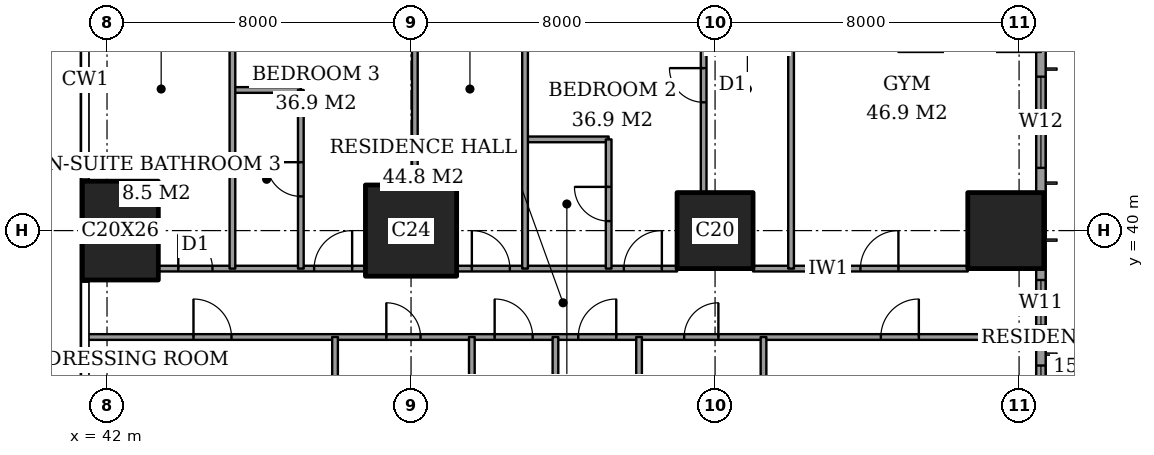
"""IFC4 building model, lengths in metres.
Left out: names, types, materials, properties, quantities, classifications, styles, units other than length and angle.
Written with IfcOpenShell. Run it as: python <this file> out.ifc"""

import sys

from ifc_helpers import new_model, si_unit, direction, frame, frame_2d, origin, origin_2d, place, context, subcontext, project, spatial, rectangle, extrude, element, fill, save


model = new_model("IFC4")
c1 = context("Model", 3, precision=1e-05, world=origin(), true_north=direction((0.0, 1.0)))
c2 = subcontext(c1, "Body", "Model", "MODEL_VIEW")
j1 = project(units=[si_unit("LENGTHUNIT", "METRE"), si_unit("PLANEANGLEUNIT", "RADIAN")], contexts=[c1])
p1 = place(None, origin())
s1 = spatial("IfcSite", under=j1, at=p1, CompositionType="ELEMENT")
p2 = place(p1, origin())
s2 = spatial("IfcBuilding", under=s1, at=p2, CompositionType="ELEMENT")
p3 = place(p2, frame((0.0, 0.0, 150.2)))
s3 = spatial("IfcBuildingStorey", under=s2, at=p3, CompositionType="ELEMENT", Elevation=150.2)
p4 = place(p3, frame((42.35, 40.0, 0.0), z_axis=(0.0, 0.0, 1.0), x_axis=(1.0, 0.0, 0.0)))
e1 = element("IfcColumn", 1, at=p4, inside=s3, PredefinedType="COLUMN", context=c2, shape_type="SweptSolid", body=[
    extrude(rectangle(XDim=2.0, YDim=2.6, at=origin_2d()), origin(), (0.0, 0.0, 1.0), 3.6),
])
p5 = place(p3, frame((50.0, 40.0, 0.0), z_axis=(0.0, 0.0, 1.0), x_axis=(1.0, 0.0, 0.0)))
e2 = element("IfcColumn", 2, at=p5, inside=s3, PredefinedType="COLUMN", context=c2, shape_type="SweptSolid", body=[
    extrude(rectangle(XDim=2.4, YDim=2.4, at=origin_2d()), origin(), (0.0, 0.0, 1.0), 3.6),
])
for number, where, z_axis, x_axis in (
    (3, (58.0, 40.0, 0.0), (0.0, 0.0, 1.0), (1.0, 0.0, 0.0)),
    (4, (65.65, 40.0, 0.0), (0.0, 0.0, 1.0), (1.0, 0.0, 0.0)),
):
    element("IfcColumn", number, at=place(p3, frame(where, z_axis=z_axis, x_axis=x_axis)), inside=s3, PredefinedType="COLUMN", context=c2, shape_type="SweptSolid", body=[
        extrude(rectangle(XDim=2.0, YDim=2.0, at=origin_2d()), origin(), (0.0, 0.0, 1.0), 3.6),
    ])
p6 = place(p3, frame((66.575, 3.175, 0.0), z_axis=(0.0, 0.0, 1.0), x_axis=(0.0, 1.0, 0.0)))
e5 = element("IfcWall", 5, at=p6, inside=s3, PredefinedType="SOLIDWALL", context=c2, shape_type="SweptSolid", body=[
    extrude(rectangle(XDim=41.65, YDim=0.25, at=frame_2d((20.825, 0.0))), origin(), (0.0, 0.0, 1.0), 3.6),
])
p7 = place(p6, frame((0.775, 0.0, 0.4)))
e6 = element("IfcOpeningElement", 6, at=p7, cuts=e5, PredefinedType="OPENING", context=c2, shape_type="SweptSolid", body=[
    extrude(rectangle(XDim=2.4, YDim=2.2, at=frame_2d((1.2, 1.1))), frame((0.0, 0.135, 0.0), z_axis=(0.0, -1.0, 0.0), x_axis=(1.0, 0.0, 0.0)), (0.0, 0.0, 1.0), 0.27),
])
p8 = place(p6, frame((6.1, 0.0, 0.4)))
e7 = element("IfcOpeningElement", 7, at=p8, cuts=e5, PredefinedType="OPENING", context=c2, shape_type="SweptSolid", body=[
    extrude(rectangle(XDim=1.2, YDim=2.2, at=frame_2d((0.6, 1.1))), frame((0.0, 0.135, 0.0), z_axis=(0.0, -1.0, 0.0), x_axis=(1.0, 0.0, 0.0)), (0.0, 0.0, 1.0), 0.27),
])
p9 = place(p6, frame((8.275, 0.0, 0.4)))
e8 = element("IfcOpeningElement", 8, at=p9, cuts=e5, PredefinedType="OPENING", context=c2, shape_type="SweptSolid", body=[
    extrude(rectangle(XDim=2.4, YDim=2.2, at=frame_2d((1.2, 1.1))), frame((0.0, 0.135, 0.0), z_axis=(0.0, -1.0, 0.0), x_axis=(1.0, 0.0, 0.0)), (0.0, 0.0, 1.0), 0.27),
])
p10 = place(p6, frame((15.775, 0.0, 0.4)))
e9 = element("IfcOpeningElement", 9, at=p10, cuts=e5, PredefinedType="OPENING", context=c2, shape_type="SweptSolid", body=[
    extrude(rectangle(XDim=2.4, YDim=2.2, at=frame_2d((1.2, 1.1))), frame((0.0, 0.135, 0.0), z_axis=(0.0, -1.0, 0.0), x_axis=(1.0, 0.0, 0.0)), (0.0, 0.0, 1.0), 0.27),
])
p11 = place(p6, frame((23.475, 0.0, 0.4)))
e10 = element("IfcOpeningElement", 10, at=p11, cuts=e5, PredefinedType="OPENING", context=c2, shape_type="SweptSolid", body=[
    extrude(rectangle(XDim=2.4, YDim=2.2, at=frame_2d((1.2, 1.1))), frame((0.0, 0.135, 0.0), z_axis=(0.0, -1.0, 0.0), x_axis=(1.0, 0.0, 0.0)), (0.0, 0.0, 1.0), 0.27),
])
p12 = place(p6, frame((30.875, 0.0, 0.4)))
e11 = element("IfcOpeningElement", 11, at=p12, cuts=e5, PredefinedType="OPENING", context=c2, shape_type="SweptSolid", body=[
    extrude(rectangle(XDim=2.4, YDim=2.2, at=frame_2d((1.2, 1.1))), frame((0.0, 0.135, 0.0), z_axis=(0.0, -1.0, 0.0), x_axis=(1.0, 0.0, 0.0)), (0.0, 0.0, 1.0), 0.27),
])
p13 = place(p6, frame((34.325, 0.0, 0.4)))
e12 = element("IfcOpeningElement", 12, at=p13, cuts=e5, PredefinedType="OPENING", context=c2, shape_type="SweptSolid", body=[
    extrude(rectangle(XDim=1.2, YDim=2.2, at=frame_2d((0.6, 1.1))), frame((0.0, 0.135, 0.0), z_axis=(0.0, -1.0, 0.0), x_axis=(1.0, 0.0, 0.0)), (0.0, 0.0, 1.0), 0.27),
])
p14 = place(p6, frame((38.475, 0.0, 0.4)))
e13 = element("IfcOpeningElement", 13, at=p14, cuts=e5, PredefinedType="OPENING", context=c2, shape_type="SweptSolid", body=[
    extrude(rectangle(XDim=2.4, YDim=2.2, at=frame_2d((1.2, 1.1))), frame((0.0, 0.135, 0.0), z_axis=(0.0, -1.0, 0.0), x_axis=(1.0, 0.0, 0.0)), (0.0, 0.0, 1.0), 0.27),
])
p15 = place(p3, frame((41.439, 37.2, 0.0), z_axis=(0.0, 0.0, 1.0), x_axis=(1.0, 0.0, 0.0)))
e14 = element("IfcWall", 14, at=p15, inside=s3, PredefinedType="PARTITIONING", context=c2, shape_type="SweptSolid", body=[
    extrude(rectangle(XDim=25.011, YDim=0.15, at=frame_2d((12.505, 0.0))), origin(), (0.0, 0.0, 1.0), 3.35),
])
p16 = place(p15, frame((10.761, 0.0, 0.0)))
e15 = element("IfcOpeningElement", 15, at=p16, cuts=e14, PredefinedType="OPENING", context=c2, shape_type="SweptSolid", body=[
    extrude(rectangle(XDim=1.0, YDim=2.1, at=frame_2d((0.5, 1.05))), frame((0.0, 0.085, 0.0), z_axis=(0.0, -1.0, 0.0), x_axis=(1.0, 0.0, 0.0)), (0.0, 0.0, 1.0), 0.17),
])
p17 = place(p15, frame((20.924, 0.0, 0.0)))
e16 = element("IfcOpeningElement", 16, at=p17, cuts=e14, PredefinedType="OPENING", context=c2, shape_type="SweptSolid", body=[
    extrude(rectangle(XDim=1.0, YDim=2.1, at=frame_2d((0.5, 1.05))), frame((0.0, 0.085, 0.0), z_axis=(0.0, -1.0, 0.0), x_axis=(1.0, 0.0, 0.0)), (0.0, 0.0, 1.0), 0.17),
])
p18 = place(p15, frame((15.749, 0.0, 0.0)))
e17 = element("IfcOpeningElement", 17, at=p18, cuts=e14, PredefinedType="OPENING", context=c2, shape_type="SweptSolid", body=[
    extrude(rectangle(XDim=0.9, YDim=2.1, at=frame_2d((0.45, 1.05))), frame((0.0, 0.085, 0.0), z_axis=(0.0, -1.0, 0.0), x_axis=(1.0, 0.0, 0.0)), (0.0, 0.0, 1.0), 0.17),
])
p19 = place(p15, frame((12.961, 0.0, 0.0)))
e18 = element("IfcOpeningElement", 18, at=p19, cuts=e14, PredefinedType="OPENING", context=c2, shape_type="SweptSolid", body=[
    extrude(rectangle(XDim=1.0, YDim=2.1, at=frame_2d((0.5, 1.05))), frame((0.0, 0.085, 0.0), z_axis=(0.0, -1.0, 0.0), x_axis=(1.0, 0.0, 0.0)), (0.0, 0.0, 1.0), 0.17),
])
p20 = place(p15, frame((7.911, 0.0, 0.0)))
e19 = element("IfcOpeningElement", 19, at=p20, cuts=e14, PredefinedType="OPENING", context=c2, shape_type="SweptSolid", body=[
    extrude(rectangle(XDim=0.9, YDim=2.1, at=frame_2d((0.45, 1.05))), frame((0.0, 0.085, 0.0), z_axis=(0.0, -1.0, 0.0), x_axis=(1.0, 0.0, 0.0)), (0.0, 0.0, 1.0), 0.17),
])
p21 = place(p15, frame((2.836, 0.0, 0.0)))
e20 = element("IfcOpeningElement", 20, at=p21, cuts=e14, PredefinedType="OPENING", context=c2, shape_type="SweptSolid", body=[
    extrude(rectangle(XDim=1.0, YDim=2.1, at=frame_2d((0.5, 1.05))), frame((0.0, 0.085, 0.0), z_axis=(0.0, -1.0, 0.0), x_axis=(1.0, 0.0, 0.0)), (0.0, 0.0, 1.0), 0.17),
])
p22 = place(p3, frame((43.35, 39.0, 0.0), z_axis=(0.0, 0.0, 1.0), x_axis=(1.0, 0.0, 0.0)))
e21 = element("IfcWall", 21, at=p22, inside=s3, PredefinedType="PARTITIONING", context=c2, shape_type="SweptSolid", body=[
    extrude(rectangle(XDim=5.45, YDim=0.15, at=frame_2d((2.725, 0.0))), origin(), (0.0, 0.0, 1.0), 3.35),
])
p23 = place(p22, frame((4.1, 0.0, 0.0)))
e22 = element("IfcOpeningElement", 22, at=p23, cuts=e21, PredefinedType="OPENING", context=c2, shape_type="SweptSolid", body=[
    extrude(rectangle(XDim=1.0, YDim=2.1, at=frame_2d((0.5, 1.05))), frame((0.0, 0.085, 0.0), z_axis=(0.0, -1.0, 0.0), x_axis=(1.0, 0.0, 0.0)), (0.0, 0.0, 1.0), 0.17),
])
p24 = place(p22, frame((0.525, 0.0, 0.0)))
e23 = element("IfcOpeningElement", 23, at=p24, cuts=e21, PredefinedType="OPENING", context=c2, shape_type="SweptSolid", body=[
    extrude(rectangle(XDim=0.9, YDim=2.1, at=frame_2d((0.45, 1.05))), frame((0.0, 0.085, 0.0), z_axis=(0.0, -1.0, 0.0), x_axis=(1.0, 0.0, 0.0)), (0.0, 0.0, 1.0), 0.17),
])
p25 = place(p3, frame((51.2, 39.0, 0.0), z_axis=(0.0, 0.0, 1.0), x_axis=(1.0, 0.0, 0.0)))
e24 = element("IfcWall", 24, at=p25, inside=s3, PredefinedType="PARTITIONING", context=c2, shape_type="SweptSolid", body=[
    extrude(rectangle(XDim=5.8, YDim=0.15, at=frame_2d((2.9, 0.0))), origin(), (0.0, 0.0, 1.0), 3.35),
])
p26 = place(p25, frame((4.4, 0.0, 0.0)))
e25 = element("IfcOpeningElement", 25, at=p26, cuts=e24, PredefinedType="OPENING", context=c2, shape_type="SweptSolid", body=[
    extrude(rectangle(XDim=1.0, YDim=2.1, at=frame_2d((0.5, 1.05))), frame((0.0, 0.085, 0.0), z_axis=(0.0, -1.0, 0.0), x_axis=(1.0, 0.0, 0.0)), (0.0, 0.0, 1.0), 0.17),
])
p27 = place(p25, frame((0.4, 0.0, 0.0)))
e26 = element("IfcOpeningElement", 26, at=p27, cuts=e24, PredefinedType="OPENING", context=c2, shape_type="SweptSolid", body=[
    extrude(rectangle(XDim=1.0, YDim=2.1, at=frame_2d((0.5, 1.05))), frame((0.0, 0.085, 0.0), z_axis=(0.0, -1.0, 0.0), x_axis=(1.0, 0.0, 0.0)), (0.0, 0.0, 1.0), 0.17),
])
p28 = place(p3, frame((59.0, 39.0, 0.0), z_axis=(0.0, 0.0, 1.0), x_axis=(1.0, 0.0, 0.0)))
e27 = element("IfcWall", 27, at=p28, inside=s3, PredefinedType="PARTITIONING", context=c2, shape_type="SweptSolid", body=[
    extrude(rectangle(XDim=5.65, YDim=0.15, at=frame_2d((2.825, 0.0))), origin(), (0.0, 0.0, 1.0), 3.35),
])
p29 = place(p28, frame((2.825, 0.0, 0.0)))
e28 = element("IfcOpeningElement", 28, at=p29, cuts=e27, PredefinedType="OPENING", context=c2, shape_type="SweptSolid", body=[
    extrude(rectangle(XDim=1.0, YDim=2.1, at=frame_2d((0.5, 1.05))), frame((0.0, 0.085, 0.0), z_axis=(0.0, -1.0, 0.0), x_axis=(1.0, 0.0, 0.0)), (0.0, 0.0, 1.0), 0.17),
])
p30 = place(p3, frame((53.0, 42.4, 0.0), z_axis=(0.0, 0.0, 1.0), x_axis=(1.0, 0.0, 0.0)))
e29 = element("IfcWall", 29, at=p30, inside=s3, PredefinedType="PARTITIONING", context=c2, shape_type="SweptSolid", body=[
    extrude(rectangle(XDim=2.2, YDim=0.15, at=frame_2d((1.1, 0.0))), origin(), (0.0, 0.0, 1.0), 3.35),
])
p31 = place(p3, frame((45.3, 43.7, 0.0), z_axis=(0.0, 0.0, 1.0), x_axis=(1.0, 0.0, 0.0)))
e30 = element("IfcWall", 30, at=p31, inside=s3, PredefinedType="PARTITIONING", context=c2, shape_type="SweptSolid", body=[
    extrude(rectangle(XDim=1.8, YDim=0.15, at=frame_2d((0.9, 0.0))), origin(), (0.0, 0.0, 1.0), 3.35),
])
p32 = place(p3, frame((45.3, 39.0, 0.0), z_axis=(0.0, 0.0, 1.0), x_axis=(0.0, 1.0, 0.0)))
e31 = element("IfcWall", 31, at=p32, inside=s3, PredefinedType="PARTITIONING", context=c2, shape_type="SweptSolid", body=[
    extrude(rectangle(XDim=9.45, YDim=0.15, at=frame_2d((4.725, 0.0))), origin(), (0.0, 0.0, 1.0), 3.35),
])
p33 = place(p3, frame((47.1, 39.0, 0.0), z_axis=(0.0, 0.0, 1.0), x_axis=(0.0, 1.0, 0.0)))
e32 = element("IfcWall", 32, at=p33, inside=s3, PredefinedType="PARTITIONING", context=c2, shape_type="SweptSolid", body=[
    extrude(rectangle(XDim=4.7, YDim=0.15, at=frame_2d((2.35, 0.0))), origin(), (0.0, 0.0, 1.0), 3.35),
])
p34 = place(p33, frame((1.9, 0.0, 0.0)))
e33 = element("IfcOpeningElement", 33, at=p34, cuts=e32, PredefinedType="OPENING", context=c2, shape_type="SweptSolid", body=[
    extrude(rectangle(XDim=0.9, YDim=2.1, at=frame_2d((0.45, 1.05))), frame((0.0, 0.085, 0.0), z_axis=(0.0, -1.0, 0.0), x_axis=(1.0, 0.0, 0.0)), (0.0, 0.0, 1.0), 0.17),
])
p35 = place(p3, frame((48.0, 28.0, 0.0), z_axis=(0.0, 0.0, 1.0), x_axis=(0.0, 1.0, 0.0)))
e34 = element("IfcWall", 34, at=p35, inside=s3, PredefinedType="PARTITIONING", context=c2, shape_type="SweptSolid", body=[
    extrude(rectangle(XDim=9.2, YDim=0.15, at=frame_2d((4.6, 0.0))), origin(), (0.0, 0.0, 1.0), 3.35),
])
p36 = place(p35, frame((0.5, 0.0, 0.0)))
e35 = element("IfcOpeningElement", 35, at=p36, cuts=e34, PredefinedType="OPENING", context=c2, shape_type="SweptSolid", body=[
    extrude(rectangle(XDim=1.0, YDim=2.1, at=frame_2d((0.5, 1.05))), frame((0.0, 0.085, 0.0), z_axis=(0.0, -1.0, 0.0), x_axis=(1.0, 0.0, 0.0)), (0.0, 0.0, 1.0), 0.17),
])
p37 = place(p3, frame((50.1, 41.2, 0.0), z_axis=(0.0, 0.0, 1.0), x_axis=(0.0, 1.0, 0.0)))
e36 = element("IfcWall", 36, at=p37, inside=s3, PredefinedType="PARTITIONING", context=c2, shape_type="SweptSolid", body=[
    extrude(rectangle(XDim=5.45, YDim=0.15, at=frame_2d((2.725, 0.0))), origin(), (0.0, 0.0, 1.0), 3.35),
])
p38 = place(p3, frame((51.6, 30.0, 0.0), z_axis=(0.0, 0.0, 1.0), x_axis=(0.0, 1.0, 0.0)))
e37 = element("IfcWall", 37, at=p38, inside=s3, PredefinedType="PARTITIONING", context=c2, shape_type="SweptSolid", body=[
    extrude(rectangle(XDim=7.2, YDim=0.15, at=frame_2d((3.6, 0.0))), origin(), (0.0, 0.0, 1.0), 3.35),
])
p39 = place(p3, frame((53.0, 39.0, 0.0), z_axis=(0.0, 0.0, 1.0), x_axis=(0.0, 1.0, 0.0)))
e38 = element("IfcWall", 38, at=p39, inside=s3, PredefinedType="PARTITIONING", context=c2, shape_type="SweptSolid", body=[
    extrude(rectangle(XDim=9.45, YDim=0.15, at=frame_2d((4.725, 0.0))), origin(), (0.0, 0.0, 1.0), 3.35),
])
p40 = place(p3, frame((53.8, 30.0, 0.0), z_axis=(0.0, 0.0, 1.0), x_axis=(0.0, 1.0, 0.0)))
e39 = element("IfcWall", 39, at=p40, inside=s3, PredefinedType="PARTITIONING", context=c2, shape_type="SweptSolid", body=[
    extrude(rectangle(XDim=7.2, YDim=0.15, at=frame_2d((3.6, 0.0))), origin(), (0.0, 0.0, 1.0), 3.35),
])
p41 = place(p3, frame((55.2, 39.0, 0.0), z_axis=(0.0, 0.0, 1.0), x_axis=(0.0, 1.0, 0.0)))
e40 = element("IfcWall", 40, at=p41, inside=s3, PredefinedType="PARTITIONING", context=c2, shape_type="SweptSolid", body=[
    extrude(rectangle(XDim=3.4, YDim=0.15, at=frame_2d((1.7, 0.0))), origin(), (0.0, 0.0, 1.0), 3.35),
])
p42 = place(p41, frame((1.25, 0.0, 0.0)))
e41 = element("IfcOpeningElement", 41, at=p42, cuts=e40, PredefinedType="OPENING", context=c2, shape_type="SweptSolid", body=[
    extrude(rectangle(XDim=0.9, YDim=2.1, at=frame_2d((0.45, 1.05))), frame((0.0, 0.085, 0.0), z_axis=(0.0, -1.0, 0.0), x_axis=(1.0, 0.0, 0.0)), (0.0, 0.0, 1.0), 0.17),
])
p43 = place(p3, frame((56.0, 28.0, 0.0), z_axis=(0.0, 0.0, 1.0), x_axis=(0.0, 1.0, 0.0)))
e42 = element("IfcWall", 42, at=p43, inside=s3, PredefinedType="PARTITIONING", context=c2, shape_type="SweptSolid", body=[
    extrude(rectangle(XDim=9.2, YDim=0.15, at=frame_2d((4.6, 0.0))), origin(), (0.0, 0.0, 1.0), 3.35),
])
p44 = place(p43, frame((0.5, 0.0, 0.0)))
e43 = element("IfcOpeningElement", 43, at=p44, cuts=e42, PredefinedType="OPENING", context=c2, shape_type="SweptSolid", body=[
    extrude(rectangle(XDim=1.0, YDim=2.1, at=frame_2d((0.5, 1.05))), frame((0.0, 0.085, 0.0), z_axis=(0.0, -1.0, 0.0), x_axis=(1.0, 0.0, 0.0)), (0.0, 0.0, 1.0), 0.17),
])
p45 = place(p3, frame((57.7, 41.0, 0.0), z_axis=(0.0, 0.0, 1.0), x_axis=(0.0, 1.0, 0.0)))
e44 = element("IfcWall", 44, at=p45, inside=s3, PredefinedType="PARTITIONING", context=c2, shape_type="SweptSolid", body=[
    extrude(rectangle(XDim=5.65, YDim=0.15, at=frame_2d((2.825, 0.0))), origin(), (0.0, 0.0, 1.0), 3.35),
])
p46 = place(p45, frame((2.375, 0.0, 0.0)))
e45 = element("IfcOpeningElement", 45, at=p46, cuts=e44, PredefinedType="OPENING", context=c2, shape_type="SweptSolid", body=[
    extrude(rectangle(XDim=0.9, YDim=2.1, at=frame_2d((0.45, 1.05))), frame((0.0, 0.085, 0.0), z_axis=(0.0, -1.0, 0.0), x_axis=(1.0, 0.0, 0.0)), (0.0, 0.0, 1.0), 0.17),
])
p47 = place(p3, frame((59.275, 33.2, 0.0), z_axis=(0.0, 0.0, 1.0), x_axis=(0.0, 1.0, 0.0)))
e46 = element("IfcWall", 46, at=p47, inside=s3, PredefinedType="PARTITIONING", context=c2, shape_type="SweptSolid", body=[
    extrude(rectangle(XDim=4.0, YDim=0.15, at=frame_2d((2.0, 0.0))), origin(), (0.0, 0.0, 1.0), 3.35),
])
p48 = place(p3, frame((60.0, 39.0, 0.0), z_axis=(0.0, 0.0, 1.0), x_axis=(0.0, 1.0, 0.0)))
e47 = element("IfcWall", 47, at=p48, inside=s3, PredefinedType="PARTITIONING", context=c2, shape_type="SweptSolid", body=[
    extrude(rectangle(XDim=9.45, YDim=0.15, at=frame_2d((4.725, 0.0))), origin(), (0.0, 0.0, 1.0), 3.35),
])
p49 = place(p12, origin())
e48 = element("IfcWindow", 48, at=p49, inside=s3, PartitioningType="SINGLE_PANEL", PredefinedType="WINDOW", context=c2, shape_type="SweptSolid", body=[
    extrude(rectangle(XDim=2.4, YDim=2.2, at=frame_2d((1.2, 1.1))), frame((0.0, 0.03, 0.0), z_axis=(0.0, -1.0, 0.0), x_axis=(1.0, 0.0, 0.0)), (0.0, 0.0, 1.0), 0.06),
])
fill(e11, e48)
p50 = place(p13, origin())
e49 = element("IfcWindow", 49, at=p50, inside=s3, PartitioningType="SINGLE_PANEL", PredefinedType="WINDOW", context=c2, shape_type="SweptSolid", body=[
    extrude(rectangle(XDim=1.2, YDim=2.2, at=frame_2d((0.6, 1.1))), frame((0.0, 0.03, 0.0), z_axis=(0.0, -1.0, 0.0), x_axis=(1.0, 0.0, 0.0)), (0.0, 0.0, 1.0), 0.06),
])
fill(e12, e49)
p51 = place(p14, origin())
e50 = element("IfcWindow", 50, at=p51, inside=s3, PartitioningType="SINGLE_PANEL", PredefinedType="WINDOW", context=c2, shape_type="SweptSolid", body=[
    extrude(rectangle(XDim=2.4, YDim=2.2, at=frame_2d((1.2, 1.1))), frame((0.0, 0.03, 0.0), z_axis=(0.0, -1.0, 0.0), x_axis=(1.0, 0.0, 0.0)), (0.0, 0.0, 1.0), 0.06),
])
fill(e13, e50)
p52 = place(p29, origin())
e51 = element("IfcDoor", 51, at=p52, inside=s3, OperationType="SINGLE_SWING_LEFT", PredefinedType="DOOR", context=c2, shape_type="SweptSolid", body=[
    extrude(rectangle(XDim=1.0, YDim=2.1, at=frame_2d((0.5, 1.05))), frame((0.0, 0.025, 0.0), z_axis=(0.0, -1.0, 0.0), x_axis=(1.0, 0.0, 0.0)), (0.0, 0.0, 1.0), 0.05),
])
fill(e28, e51)
p53 = place(p46, origin())
e52 = element("IfcDoor", 52, at=p53, inside=s3, OperationType="SINGLE_SWING_LEFT", PredefinedType="DOOR", context=c2, shape_type="SweptSolid", body=[
    extrude(rectangle(XDim=0.9, YDim=2.1, at=frame_2d((0.45, 1.05))), frame((0.0, 0.025, 0.0), z_axis=(0.0, -1.0, 0.0), x_axis=(1.0, 0.0, 0.0)), (0.0, 0.0, 1.0), 0.05),
])
fill(e45, e52)
p54 = place(p42, origin())
e53 = element("IfcDoor", 53, at=p54, inside=s3, OperationType="SINGLE_SWING_LEFT", PredefinedType="DOOR", context=c2, shape_type="SweptSolid", body=[
    extrude(rectangle(XDim=0.9, YDim=2.1, at=frame_2d((0.45, 1.05))), frame((0.0, 0.025, 0.0), z_axis=(0.0, -1.0, 0.0), x_axis=(1.0, 0.0, 0.0)), (0.0, 0.0, 1.0), 0.05),
])
fill(e41, e53)
p55 = place(p26, origin())
e54 = element("IfcDoor", 54, at=p55, inside=s3, OperationType="SINGLE_SWING_LEFT", PredefinedType="DOOR", context=c2, shape_type="SweptSolid", body=[
    extrude(rectangle(XDim=1.0, YDim=2.1, at=frame_2d((0.5, 1.05))), frame((0.0, 0.025, 0.0), z_axis=(0.0, -1.0, 0.0), x_axis=(1.0, 0.0, 0.0)), (0.0, 0.0, 1.0), 0.05),
])
fill(e25, e54)
p56 = place(p27, origin())
e55 = element("IfcDoor", 55, at=p56, inside=s3, OperationType="SINGLE_SWING_RIGHT", PredefinedType="DOOR", context=c2, shape_type="SweptSolid", body=[
    extrude(rectangle(XDim=1.0, YDim=2.1, at=frame_2d((0.5, 1.05))), frame((0.0, 0.025, 0.0), z_axis=(0.0, -1.0, 0.0), x_axis=(1.0, 0.0, 0.0)), (0.0, 0.0, 1.0), 0.05),
])
fill(e26, e55)
p57 = place(p34, origin())
e56 = element("IfcDoor", 56, at=p57, inside=s3, OperationType="SINGLE_SWING_LEFT", PredefinedType="DOOR", context=c2, shape_type="SweptSolid", body=[
    extrude(rectangle(XDim=0.9, YDim=2.1, at=frame_2d((0.45, 1.05))), frame((0.0, 0.025, 0.0), z_axis=(0.0, -1.0, 0.0), x_axis=(1.0, 0.0, 0.0)), (0.0, 0.0, 1.0), 0.05),
])
fill(e33, e56)
p58 = place(p23, origin())
e57 = element("IfcDoor", 57, at=p58, inside=s3, OperationType="SINGLE_SWING_LEFT", PredefinedType="DOOR", context=c2, shape_type="SweptSolid", body=[
    extrude(rectangle(XDim=1.0, YDim=2.1, at=frame_2d((0.5, 1.05))), frame((0.0, 0.025, 0.0), z_axis=(0.0, -1.0, 0.0), x_axis=(1.0, 0.0, 0.0)), (0.0, 0.0, 1.0), 0.05),
])
fill(e22, e57)
p59 = place(p24, origin())
e58 = element("IfcDoor", 58, at=p59, inside=s3, OperationType="SINGLE_SWING_RIGHT", PredefinedType="DOOR", context=c2, shape_type="SweptSolid", body=[
    extrude(rectangle(XDim=0.9, YDim=2.1, at=frame_2d((0.45, 1.05))), frame((0.0, 0.025, 0.0), z_axis=(0.0, -1.0, 0.0), x_axis=(1.0, 0.0, 0.0)), (0.0, 0.0, 1.0), 0.05),
])
fill(e23, e58)
p60 = place(p16, origin())
e59 = element("IfcDoor", 59, at=p60, inside=s3, OperationType="SINGLE_SWING_RIGHT", PredefinedType="DOOR", context=c2, shape_type="SweptSolid", body=[
    extrude(rectangle(XDim=1.0, YDim=2.1, at=frame_2d((0.5, 1.05))), frame((0.0, 0.025, 0.0), z_axis=(0.0, -1.0, 0.0), x_axis=(1.0, 0.0, 0.0)), (0.0, 0.0, 1.0), 0.05),
])
fill(e15, e59)
p61 = place(p17, origin())
e60 = element("IfcDoor", 60, at=p61, inside=s3, OperationType="SINGLE_SWING_LEFT", PredefinedType="DOOR", context=c2, shape_type="SweptSolid", body=[
    extrude(rectangle(XDim=1.0, YDim=2.1, at=frame_2d((0.5, 1.05))), frame((0.0, 0.025, 0.0), z_axis=(0.0, -1.0, 0.0), x_axis=(1.0, 0.0, 0.0)), (0.0, 0.0, 1.0), 0.05),
])
fill(e16, e60)
p62 = place(p18, origin())
e61 = element("IfcDoor", 61, at=p62, inside=s3, OperationType="SINGLE_SWING_LEFT", PredefinedType="DOOR", context=c2, shape_type="SweptSolid", body=[
    extrude(rectangle(XDim=0.9, YDim=2.1, at=frame_2d((0.45, 1.05))), frame((0.0, 0.025, 0.0), z_axis=(0.0, -1.0, 0.0), x_axis=(1.0, 0.0, 0.0)), (0.0, 0.0, 1.0), 0.05),
])
fill(e17, e61)
p63 = place(p19, origin())
e62 = element("IfcDoor", 62, at=p63, inside=s3, OperationType="SINGLE_SWING_LEFT", PredefinedType="DOOR", context=c2, shape_type="SweptSolid", body=[
    extrude(rectangle(XDim=1.0, YDim=2.1, at=frame_2d((0.5, 1.05))), frame((0.0, 0.025, 0.0), z_axis=(0.0, -1.0, 0.0), x_axis=(1.0, 0.0, 0.0)), (0.0, 0.0, 1.0), 0.05),
])
fill(e18, e62)
p64 = place(p20, origin())
e63 = element("IfcDoor", 63, at=p64, inside=s3, OperationType="SINGLE_SWING_RIGHT", PredefinedType="DOOR", context=c2, shape_type="SweptSolid", body=[
    extrude(rectangle(XDim=0.9, YDim=2.1, at=frame_2d((0.45, 1.05))), frame((0.0, 0.025, 0.0), z_axis=(0.0, -1.0, 0.0), x_axis=(1.0, 0.0, 0.0)), (0.0, 0.0, 1.0), 0.05),
])
fill(e19, e63)
p65 = place(p21, origin())
e64 = element("IfcDoor", 64, at=p65, inside=s3, OperationType="SINGLE_SWING_RIGHT", PredefinedType="DOOR", context=c2, shape_type="SweptSolid", body=[
    extrude(rectangle(XDim=1.0, YDim=2.1, at=frame_2d((0.5, 1.05))), frame((0.0, 0.025, 0.0), z_axis=(0.0, -1.0, 0.0), x_axis=(1.0, 0.0, 0.0)), (0.0, 0.0, 1.0), 0.05),
])
fill(e20, e64)
save(model, sys.argv[1])
